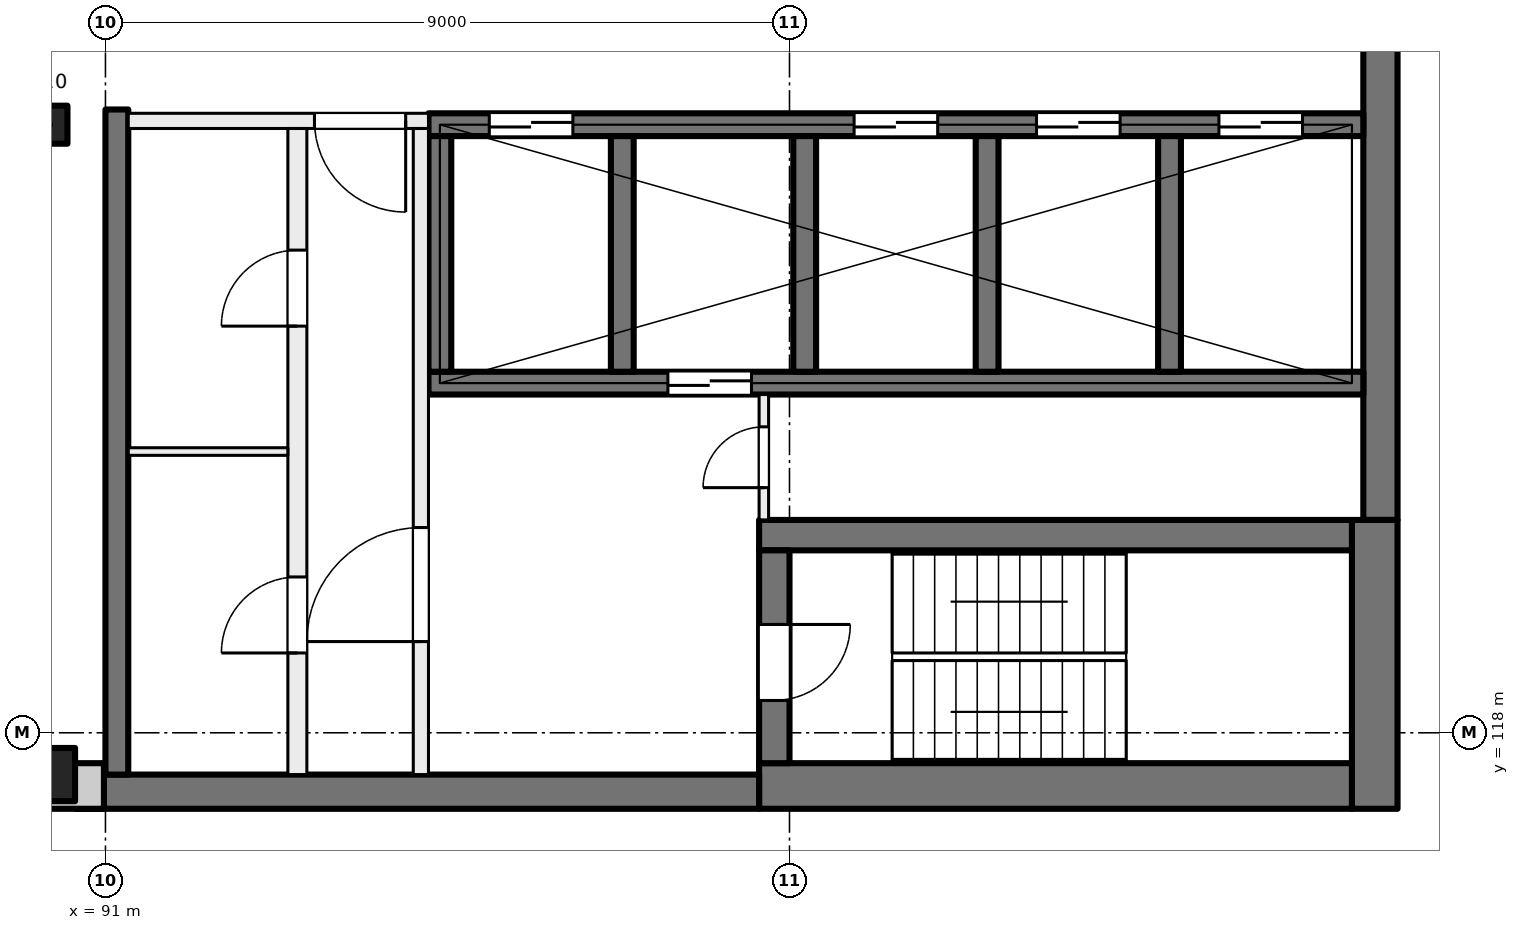
"""IFC4 building model, lengths in metres.
Left out: names, types, materials, properties, quantities, classifications, styles, units other than length and angle.
Written with IfcOpenShell. Run it as: python <this file> out.ifc"""

import sys

from ifc_helpers import new_model, si_unit, direction, frame, frame_2d, origin, origin_2d, place, context, subcontext, project, spatial, rectangle, extrude, element, fill, save


model = new_model("IFC4")
c1 = context("Model", 3, precision=1e-05, world=origin(), true_north=direction((0.0, 1.0)))
c2 = subcontext(c1, "Body", "Model", "MODEL_VIEW")
j1 = project(units=[si_unit("LENGTHUNIT", "METRE"), si_unit("PLANEANGLEUNIT", "RADIAN")], contexts=[c1])
p1 = place(None, origin())
s1 = spatial("IfcSite", under=j1, at=p1, CompositionType="ELEMENT")
p2 = place(p1, origin())
s2 = spatial("IfcBuilding", under=s1, at=p2, CompositionType="ELEMENT")
p3 = place(p2, frame((0.0, 0.0, 241.5)))
s3 = spatial("IfcBuildingStorey", under=s2, at=p3, CompositionType="ELEMENT", Elevation=241.5)
p4 = place(p3, frame((90.25, 126.0, 0.0), z_axis=(0.0, 0.0, 1.0), x_axis=(1.0, 0.0, 0.0)))
e1 = element("IfcColumn", 1, at=p4, inside=s3, PredefinedType="COLUMN", context=c2, shape_type="SweptSolid", body=[
    extrude(rectangle(XDim=0.5, YDim=0.5, at=origin_2d()), origin(), (0.0, 0.0, 1.0), 4.0),
])
p5 = place(p3, frame((90.25, 117.45, 0.0), z_axis=(0.0, 0.0, 1.0), x_axis=(1.0, 0.0, 0.0)))
e2 = element("IfcColumn", 2, at=p5, inside=s3, PredefinedType="COLUMN", context=c2, shape_type="SweptSolid", body=[
    extrude(rectangle(XDim=0.7, YDim=0.7, at=origin_2d()), origin(), (0.0, 0.0, 1.0), 4.0),
])
p6 = place(p3, frame((107.775, 135.2, 0.0), z_axis=(0.0, 0.0, 1.0), x_axis=(0.0, -1.0, 0.0)))
e3 = element("IfcWall", 3, at=p6, inside=s3, PredefinedType="SHEAR", context=c2, shape_type="SweptSolid", body=[
    extrude(rectangle(XDim=14.4, YDim=0.45, at=frame_2d((7.2, 0.0))), origin(), (0.0, 0.0, 1.0), 4.0),
])
p7 = place(p3, frame((107.7, 120.8, 0.0), z_axis=(0.0, 0.0, 1.0), x_axis=(0.0, -1.0, 0.0)))
e4 = element("IfcWall", 4, at=p7, inside=s3, PredefinedType="SHEAR", context=c2, shape_type="SweptSolid", body=[
    extrude(rectangle(XDim=3.8, YDim=0.6, at=frame_2d((1.9, 0.0))), origin(), (0.0, 0.0, 1.0), 4.0),
])
p8 = place(p3, frame((107.4, 117.3, 0.0), z_axis=(0.0, 0.0, 1.0), x_axis=(-1.0, 0.0, 0.0)))
e5 = element("IfcWall", 5, at=p8, inside=s3, PredefinedType="SHEAR", context=c2, shape_type="SweptSolid", body=[
    extrude(rectangle(XDim=7.8, YDim=0.6, at=frame_2d((3.9, 0.0))), origin(), (0.0, 0.0, 1.0), 4.0),
])
p9 = place(p3, frame((99.6, 117.225, 0.0), z_axis=(0.0, 0.0, 1.0), x_axis=(-1.0, 0.0, 0.0)))
e6 = element("IfcWall", 6, at=p9, inside=s3, PredefinedType="SHEAR", context=c2, shape_type="SweptSolid", body=[
    extrude(rectangle(XDim=9.0, YDim=0.45, at=frame_2d((4.5, 0.0))), origin(), (0.0, 0.0, 1.0), 4.0),
])
p10 = place(p3, frame((107.4, 120.6, 0.0), z_axis=(0.0, 0.0, 1.0), x_axis=(-1.0, 0.0, 0.0)))
e7 = element("IfcWall", 7, at=p10, inside=s3, PredefinedType="SHEAR", context=c2, shape_type="SweptSolid", body=[
    extrude(rectangle(XDim=7.8, YDim=0.4, at=frame_2d((3.9, 0.0))), origin(), (0.0, 0.0, 1.0), 4.0),
])
p11 = place(p3, frame((99.8, 120.4, 0.0), z_axis=(0.0, 0.0, 1.0), x_axis=(0.0, -1.0, 0.0)))
e8 = element("IfcWall", 8, at=p11, inside=s3, PredefinedType="SHEAR", context=c2, shape_type="SweptSolid", body=[
    extrude(rectangle(XDim=2.8, YDim=0.4, at=frame_2d((1.4, 0.0))), origin(), (0.0, 0.0, 1.0), 4.0),
])
p12 = place(p11, frame((0.975, 0.0, 0.0)))
e9 = element("IfcOpeningElement", 9, at=p12, cuts=e8, PredefinedType="OPENING", context=c2, shape_type="SweptSolid", body=[
    extrude(rectangle(XDim=1.0, YDim=2.1, at=frame_2d((0.5, 1.05))), frame((0.0, 0.21, 0.0), z_axis=(0.0, -1.0, 0.0), x_axis=(1.0, 0.0, 0.0)), (0.0, 0.0, 1.0), 0.42),
])
p13 = place(p3, frame((107.55, 126.0, 0.0), z_axis=(0.0, 0.0, 1.0), x_axis=(-1.0, 0.0, 0.0)))
e10 = element("IfcWall", 10, at=p13, inside=s3, PredefinedType="SHEAR", context=c2, shape_type="SweptSolid", body=[
    extrude(rectangle(XDim=12.3, YDim=0.3, at=frame_2d((6.15, 0.0))), origin(), (0.0, 0.0, 1.0), 4.0),
])
p14 = place(p13, frame((0.8, 0.0, 0.0)))
e11 = element("IfcOpeningElement", 11, at=p14, cuts=e10, PredefinedType="OPENING", context=c2, shape_type="SweptSolid", body=[
    extrude(rectangle(XDim=1.1, YDim=2.1, at=frame_2d((0.55, 1.05))), frame((0.0, 0.16, 0.0), z_axis=(0.0, -1.0, 0.0), x_axis=(1.0, 0.0, 0.0)), (0.0, 0.0, 1.0), 0.32),
])
p15 = place(p13, frame((3.2, 0.0, 0.0)))
e12 = element("IfcOpeningElement", 12, at=p15, cuts=e10, PredefinedType="OPENING", context=c2, shape_type="SweptSolid", body=[
    extrude(rectangle(XDim=1.1, YDim=2.1, at=frame_2d((0.55, 1.05))), frame((0.0, 0.16, 0.0), z_axis=(0.0, -1.0, 0.0), x_axis=(1.0, 0.0, 0.0)), (0.0, 0.0, 1.0), 0.32),
])
p16 = place(p13, frame((5.6, 0.0, 0.0)))
e13 = element("IfcOpeningElement", 13, at=p16, cuts=e10, PredefinedType="OPENING", context=c2, shape_type="SweptSolid", body=[
    extrude(rectangle(XDim=1.1, YDim=2.1, at=frame_2d((0.55, 1.05))), frame((0.0, 0.16, 0.0), z_axis=(0.0, -1.0, 0.0), x_axis=(1.0, 0.0, 0.0)), (0.0, 0.0, 1.0), 0.32),
])
p17 = place(p13, frame((10.4, 0.0, 0.0)))
e14 = element("IfcOpeningElement", 14, at=p17, cuts=e10, PredefinedType="OPENING", context=c2, shape_type="SweptSolid", body=[
    extrude(rectangle(XDim=1.1, YDim=2.1, at=frame_2d((0.55, 1.05))), frame((0.0, 0.16, 0.0), z_axis=(0.0, -1.0, 0.0), x_axis=(1.0, 0.0, 0.0)), (0.0, 0.0, 1.0), 0.32),
])
p18 = place(p3, frame((107.55, 122.6, 0.0), z_axis=(0.0, 0.0, 1.0), x_axis=(-1.0, 0.0, 0.0)))
e15 = element("IfcWall", 15, at=p18, inside=s3, PredefinedType="SHEAR", context=c2, shape_type="SweptSolid", body=[
    extrude(rectangle(XDim=12.3, YDim=0.3, at=frame_2d((6.15, 0.0))), origin(), (0.0, 0.0, 1.0), 4.0),
])
p19 = place(p18, frame((8.05, 0.0, 0.0)))
e16 = element("IfcOpeningElement", 16, at=p19, cuts=e15, PredefinedType="OPENING", context=c2, shape_type="SweptSolid", body=[
    extrude(rectangle(XDim=1.1, YDim=2.1, at=frame_2d((0.55, 1.05))), frame((0.0, 0.16, 0.0), z_axis=(0.0, -1.0, 0.0), x_axis=(1.0, 0.0, 0.0)), (0.0, 0.0, 1.0), 0.32),
])
for number, where, z_axis, x_axis in (
    (17, (105.0, 125.85, 0.0), (0.0, 0.0, 1.0), (0.0, -1.0, 0.0)),
    (18, (102.6, 125.85, 0.0), (0.0, 0.0, 1.0), (0.0, -1.0, 0.0)),
    (19, (100.2, 125.85, 0.0), (0.0, 0.0, 1.0), (0.0, -1.0, 0.0)),
    (20, (97.8, 125.85, 0.0), (0.0, 0.0, 1.0), (0.0, -1.0, 0.0)),
    (21, (95.4, 125.85, 0.0), (0.0, 0.0, 1.0), (0.0, -1.0, 0.0)),
):
    element("IfcWall", number, at=place(p3, frame(where, z_axis=z_axis, x_axis=x_axis)), inside=s3, PredefinedType="SHEAR", context=c2, shape_type="SweptSolid", body=[
        extrude(rectangle(XDim=3.1, YDim=0.3, at=frame_2d((1.55, 0.0))), origin(), (0.0, 0.0, 1.0), 4.0),
    ])
p20 = place(p3, frame((91.15, 126.2, 0.0), z_axis=(0.0, 0.0, 1.0), x_axis=(0.0, -1.0, 0.0)))
e22 = element("IfcWall", 22, at=p20, inside=s3, PredefinedType="SHEAR", context=c2, shape_type="SweptSolid", body=[
    extrude(rectangle(XDim=8.75, YDim=0.3, at=frame_2d((4.375, 0.0))), origin(), (0.0, 0.0, 1.0), 4.0),
])
p21 = place(p3, frame((90.98, 117.3, 0.0), z_axis=(0.0, 0.0, 1.0), x_axis=(-1.0, 0.0, 0.0)))
e23 = element("IfcWall", 23, at=p21, inside=s3, PredefinedType="SOLIDWALL", context=c2, shape_type="SweptSolid", body=[
    extrude(rectangle(XDim=43.98, YDim=0.6, at=frame_2d((21.99, 0.0))), origin(), (0.0, 0.0, 1.0), 3.625),
])
p22 = place(p21, frame((1.48, 0.0, 0.9)))
e24 = element("IfcOpeningElement", 24, at=p22, cuts=e23, PredefinedType="OPENING", context=c2, shape_type="SweptSolid", body=[
    extrude(rectangle(XDim=3.0, YDim=2.4, at=frame_2d((1.5, 1.2))), frame((0.0, 0.31, 0.0), z_axis=(0.0, -1.0, 0.0), x_axis=(1.0, 0.0, 0.0)), (0.0, 0.0, 1.0), 0.62),
])
p23 = place(p21, frame((5.98, 0.0, 0.9)))
e25 = element("IfcOpeningElement", 25, at=p23, cuts=e23, PredefinedType="OPENING", context=c2, shape_type="SweptSolid", body=[
    extrude(rectangle(XDim=3.0, YDim=2.4, at=frame_2d((1.5, 1.2))), frame((0.0, 0.31, 0.0), z_axis=(0.0, -1.0, 0.0), x_axis=(1.0, 0.0, 0.0)), (0.0, 0.0, 1.0), 0.62),
])
p24 = place(p21, frame((10.48, 0.0, 0.9)))
e26 = element("IfcOpeningElement", 26, at=p24, cuts=e23, PredefinedType="OPENING", context=c2, shape_type="SweptSolid", body=[
    extrude(rectangle(XDim=3.0, YDim=2.4, at=frame_2d((1.5, 1.2))), frame((0.0, 0.31, 0.0), z_axis=(0.0, -1.0, 0.0), x_axis=(1.0, 0.0, 0.0)), (0.0, 0.0, 1.0), 0.62),
])
p25 = place(p21, frame((14.98, 0.0, 0.9)))
e27 = element("IfcOpeningElement", 27, at=p25, cuts=e23, PredefinedType="OPENING", context=c2, shape_type="SweptSolid", body=[
    extrude(rectangle(XDim=3.0, YDim=2.4, at=frame_2d((1.5, 1.2))), frame((0.0, 0.31, 0.0), z_axis=(0.0, -1.0, 0.0), x_axis=(1.0, 0.0, 0.0)), (0.0, 0.0, 1.0), 0.62),
])
p26 = place(p21, frame((19.48, 0.0, 0.9)))
e28 = element("IfcOpeningElement", 28, at=p26, cuts=e23, PredefinedType="OPENING", context=c2, shape_type="SweptSolid", body=[
    extrude(rectangle(XDim=3.0, YDim=2.4, at=frame_2d((1.5, 1.2))), frame((0.0, 0.31, 0.0), z_axis=(0.0, -1.0, 0.0), x_axis=(1.0, 0.0, 0.0)), (0.0, 0.0, 1.0), 0.62),
])
p27 = place(p21, frame((23.98, 0.0, 0.9)))
e29 = element("IfcOpeningElement", 29, at=p27, cuts=e23, PredefinedType="OPENING", context=c2, shape_type="SweptSolid", body=[
    extrude(rectangle(XDim=3.0, YDim=2.4, at=frame_2d((1.5, 1.2))), frame((0.0, 0.31, 0.0), z_axis=(0.0, -1.0, 0.0), x_axis=(1.0, 0.0, 0.0)), (0.0, 0.0, 1.0), 0.62),
])
p28 = place(p21, frame((29.08, 0.0, 0.0)))
e30 = element("IfcOpeningElement", 30, at=p28, cuts=e23, PredefinedType="OPENING", context=c2, shape_type="SweptSolid", body=[
    extrude(rectangle(XDim=1.8, YDim=2.4, at=frame_2d((0.9, 1.2))), frame((0.0, 0.31, 0.0), z_axis=(0.0, -1.0, 0.0), x_axis=(1.0, 0.0, 0.0)), (0.0, 0.0, 1.0), 0.62),
])
p29 = place(p21, frame((32.98, 0.0, 0.9)))
e31 = element("IfcOpeningElement", 31, at=p29, cuts=e23, PredefinedType="OPENING", context=c2, shape_type="SweptSolid", body=[
    extrude(rectangle(XDim=3.0, YDim=2.4, at=frame_2d((1.5, 1.2))), frame((0.0, 0.31, 0.0), z_axis=(0.0, -1.0, 0.0), x_axis=(1.0, 0.0, 0.0)), (0.0, 0.0, 1.0), 0.62),
])
p30 = place(p21, frame((37.48, 0.0, 0.9)))
e32 = element("IfcOpeningElement", 32, at=p30, cuts=e23, PredefinedType="OPENING", context=c2, shape_type="SweptSolid", body=[
    extrude(rectangle(XDim=3.0, YDim=2.4, at=frame_2d((1.5, 1.2))), frame((0.0, 0.31, 0.0), z_axis=(0.0, -1.0, 0.0), x_axis=(1.0, 0.0, 0.0)), (0.0, 0.0, 1.0), 0.62),
])
p31 = place(p3, frame((95.25, 126.05, 0.0), z_axis=(0.0, 0.0, 1.0), x_axis=(-1.0, 0.0, 0.0)))
e33 = element("IfcWall", 33, at=p31, inside=s3, PredefinedType="PARTITIONING", context=c2, shape_type="SweptSolid", body=[
    extrude(rectangle(XDim=3.95, YDim=0.2, at=frame_2d((1.975, 0.0))), origin(), (0.0, 0.0, 1.0), 3.625),
])
p32 = place(p31, frame((0.3, 0.0, 0.0)))
e34 = element("IfcOpeningElement", 34, at=p32, cuts=e33, PredefinedType="OPENING", context=c2, shape_type="SweptSolid", body=[
    extrude(rectangle(XDim=1.2, YDim=2.1, at=frame_2d((0.6, 1.05))), frame((0.0, 0.11, 0.0), z_axis=(0.0, -1.0, 0.0), x_axis=(1.0, 0.0, 0.0)), (0.0, 0.0, 1.0), 0.22),
])
p33 = place(p3, frame((95.15, 117.45, 0.0), z_axis=(0.0, 0.0, 1.0), x_axis=(0.0, 1.0, 0.0)))
e35 = element("IfcWall", 35, at=p33, inside=s3, PredefinedType="PARTITIONING", context=c2, shape_type="SweptSolid", body=[
    extrude(rectangle(XDim=8.5, YDim=0.2, at=frame_2d((4.25, 0.0))), origin(), (0.0, 0.0, 1.0), 3.625),
])
p34 = place(p33, frame((1.75, 0.0, 0.0)))
e36 = element("IfcOpeningElement", 36, at=p34, cuts=e35, PredefinedType="OPENING", context=c2, shape_type="SweptSolid", body=[
    extrude(rectangle(XDim=1.5, YDim=2.1, at=frame_2d((0.75, 1.05))), frame((0.0, 0.11, 0.0), z_axis=(0.0, -1.0, 0.0), x_axis=(1.0, 0.0, 0.0)), (0.0, 0.0, 1.0), 0.22),
])
p35 = place(p3, frame((93.525, 117.45, 0.0), z_axis=(0.0, 0.0, 1.0), x_axis=(0.0, 1.0, 0.0)))
e37 = element("IfcWall", 37, at=p35, inside=s3, PredefinedType="PARTITIONING", context=c2, shape_type="SweptSolid", body=[
    extrude(rectangle(XDim=8.5, YDim=0.25, at=frame_2d((4.25, 0.0))), origin(), (0.0, 0.0, 1.0), 3.625),
])
p36 = place(p35, frame((5.9, 0.0, 0.0)))
e38 = element("IfcOpeningElement", 38, at=p36, cuts=e37, PredefinedType="OPENING", context=c2, shape_type="SweptSolid", body=[
    extrude(rectangle(XDim=1.0, YDim=2.1, at=frame_2d((0.5, 1.05))), frame((0.0, 0.135, 0.0), z_axis=(0.0, -1.0, 0.0), x_axis=(1.0, 0.0, 0.0)), (0.0, 0.0, 1.0), 0.27),
])
p37 = place(p35, frame((1.6, 0.0, 0.0)))
e39 = element("IfcOpeningElement", 39, at=p37, cuts=e37, PredefinedType="OPENING", context=c2, shape_type="SweptSolid", body=[
    extrude(rectangle(XDim=1.0, YDim=2.1, at=frame_2d((0.5, 1.05))), frame((0.0, 0.135, 0.0), z_axis=(0.0, -1.0, 0.0), x_axis=(1.0, 0.0, 0.0)), (0.0, 0.0, 1.0), 0.27),
])
p38 = place(p3, frame((99.663, 120.8, 0.0), z_axis=(0.0, 0.0, 1.0), x_axis=(0.0, 1.0, 0.0)))
e40 = element("IfcWall", 40, at=p38, inside=s3, PredefinedType="PARTITIONING", context=c2, shape_type="SweptSolid", body=[
    extrude(rectangle(XDim=1.65, YDim=0.125, at=frame_2d((0.825, 0.0))), origin(), (0.0, 0.0, 1.0), 3.625),
])
p39 = place(p38, frame((0.425, 0.0, 0.0)))
e41 = element("IfcOpeningElement", 41, at=p39, cuts=e40, PredefinedType="OPENING", context=c2, shape_type="SweptSolid", body=[
    extrude(rectangle(XDim=0.8, YDim=2.1, at=frame_2d((0.4, 1.05))), frame((0.0, 0.073, 0.0), z_axis=(0.0, -1.0, 0.0), x_axis=(1.0, 0.0, 0.0)), (0.0, 0.0, 1.0), 0.145),
])
p40 = place(p3, frame((93.4, 121.7, 0.0), z_axis=(0.0, 0.0, 1.0), x_axis=(-1.0, 0.0, 0.0)))
e42 = element("IfcWall", 42, at=p40, inside=s3, PredefinedType="PARTITIONING", context=c2, shape_type="SweptSolid", body=[
    extrude(rectangle(XDim=2.1, YDim=0.1, at=frame_2d((1.05, 0.0))), origin(), (0.0, 0.0, 1.0), 3.625),
])
p41 = place(p14, origin())
e43 = element("IfcDoor", 43, at=p41, inside=s3, OperationType="DOUBLE_DOOR_SLIDING", PredefinedType="DOOR", context=c2, shape_type="SweptSolid", body=[
    extrude(rectangle(XDim=1.1, YDim=2.1, at=frame_2d((0.55, 1.05))), frame((0.0, 0.025, 0.0), z_axis=(0.0, -1.0, 0.0), x_axis=(1.0, 0.0, 0.0)), (0.0, 0.0, 1.0), 0.05),
])
fill(e11, e43)
p42 = place(p15, origin())
e44 = element("IfcDoor", 44, at=p42, inside=s3, OperationType="DOUBLE_DOOR_SLIDING", PredefinedType="DOOR", context=c2, shape_type="SweptSolid", body=[
    extrude(rectangle(XDim=1.1, YDim=2.1, at=frame_2d((0.55, 1.05))), frame((0.0, 0.025, 0.0), z_axis=(0.0, -1.0, 0.0), x_axis=(1.0, 0.0, 0.0)), (0.0, 0.0, 1.0), 0.05),
])
fill(e12, e44)
p43 = place(p16, origin())
e45 = element("IfcDoor", 45, at=p43, inside=s3, OperationType="DOUBLE_DOOR_SLIDING", PredefinedType="DOOR", context=c2, shape_type="SweptSolid", body=[
    extrude(rectangle(XDim=1.1, YDim=2.1, at=frame_2d((0.55, 1.05))), frame((0.0, 0.025, 0.0), z_axis=(0.0, -1.0, 0.0), x_axis=(1.0, 0.0, 0.0)), (0.0, 0.0, 1.0), 0.05),
])
fill(e13, e45)
p44 = place(p17, origin())
e46 = element("IfcDoor", 46, at=p44, inside=s3, OperationType="DOUBLE_DOOR_SLIDING", PredefinedType="DOOR", context=c2, shape_type="SweptSolid", body=[
    extrude(rectangle(XDim=1.1, YDim=2.1, at=frame_2d((0.55, 1.05))), frame((0.0, 0.025, 0.0), z_axis=(0.0, -1.0, 0.0), x_axis=(1.0, 0.0, 0.0)), (0.0, 0.0, 1.0), 0.05),
])
fill(e14, e46)
p45 = place(p32, origin())
e47 = element("IfcDoor", 47, at=p45, inside=s3, OperationType="DOUBLE_DOOR_SINGLE_SWING", PredefinedType="DOOR", context=c2, shape_type="SweptSolid", body=[
    extrude(rectangle(XDim=1.2, YDim=2.1, at=frame_2d((0.6, 1.05))), frame((0.0, 0.025, 0.0), z_axis=(0.0, -1.0, 0.0), x_axis=(1.0, 0.0, 0.0)), (0.0, 0.0, 1.0), 0.05),
])
fill(e34, e47)
p46 = place(p34, origin())
e48 = element("IfcDoor", 48, at=p46, inside=s3, OperationType="DOUBLE_DOOR_SINGLE_SWING", PredefinedType="DOOR", context=c2, shape_type="SweptSolid", body=[
    extrude(rectangle(XDim=1.5, YDim=2.1, at=frame_2d((0.75, 1.05))), frame((0.0, 0.025, 0.0), z_axis=(0.0, -1.0, 0.0), x_axis=(1.0, 0.0, 0.0)), (0.0, 0.0, 1.0), 0.05),
])
fill(e36, e48)
p47 = place(p12, origin())
e49 = element("IfcDoor", 49, at=p47, inside=s3, OperationType="SINGLE_SWING_LEFT", PredefinedType="DOOR", context=c2, shape_type="SweptSolid", body=[
    extrude(rectangle(XDim=1.0, YDim=2.1, at=frame_2d((0.5, 1.05))), frame((0.0, 0.025, 0.0), z_axis=(0.0, -1.0, 0.0), x_axis=(1.0, 0.0, 0.0)), (0.0, 0.0, 1.0), 0.05),
])
fill(e9, e49)
p48 = place(p39, origin())
e50 = element("IfcDoor", 50, at=p48, inside=s3, OperationType="SINGLE_SWING_RIGHT", PredefinedType="DOOR", context=c2, shape_type="SweptSolid", body=[
    extrude(rectangle(XDim=0.8, YDim=2.1, at=frame_2d((0.4, 1.05))), frame((0.0, 0.025, 0.0), z_axis=(0.0, -1.0, 0.0), x_axis=(1.0, 0.0, 0.0)), (0.0, 0.0, 1.0), 0.05),
])
fill(e41, e50)
p49 = place(p36, origin())
e51 = element("IfcDoor", 51, at=p49, inside=s3, OperationType="SINGLE_SWING_LEFT", PredefinedType="DOOR", context=c2, shape_type="SweptSolid", body=[
    extrude(rectangle(XDim=1.0, YDim=2.1, at=frame_2d((0.5, 1.05))), frame((0.0, 0.025, 0.0), z_axis=(0.0, -1.0, 0.0), x_axis=(1.0, 0.0, 0.0)), (0.0, 0.0, 1.0), 0.05),
])
fill(e38, e51)
p50 = place(p37, origin())
e52 = element("IfcDoor", 52, at=p50, inside=s3, OperationType="SINGLE_SWING_RIGHT", PredefinedType="DOOR", context=c2, shape_type="SweptSolid", body=[
    extrude(rectangle(XDim=1.0, YDim=2.1, at=frame_2d((0.5, 1.05))), frame((0.0, 0.025, 0.0), z_axis=(0.0, -1.0, 0.0), x_axis=(1.0, 0.0, 0.0)), (0.0, 0.0, 1.0), 0.05),
])
fill(e39, e52)
p51 = place(p19, origin())
e53 = element("IfcDoor", 53, at=p51, inside=s3, OperationType="DOUBLE_DOOR_SLIDING", PredefinedType="DOOR", context=c2, shape_type="SweptSolid", body=[
    extrude(rectangle(XDim=1.1, YDim=2.1, at=frame_2d((0.55, 1.05))), frame((0.0, 0.025, 0.0), z_axis=(0.0, -1.0, 0.0), x_axis=(1.0, 0.0, 0.0)), (0.0, 0.0, 1.0), 0.05),
])
fill(e16, e53)
save(model, sys.argv[1])
